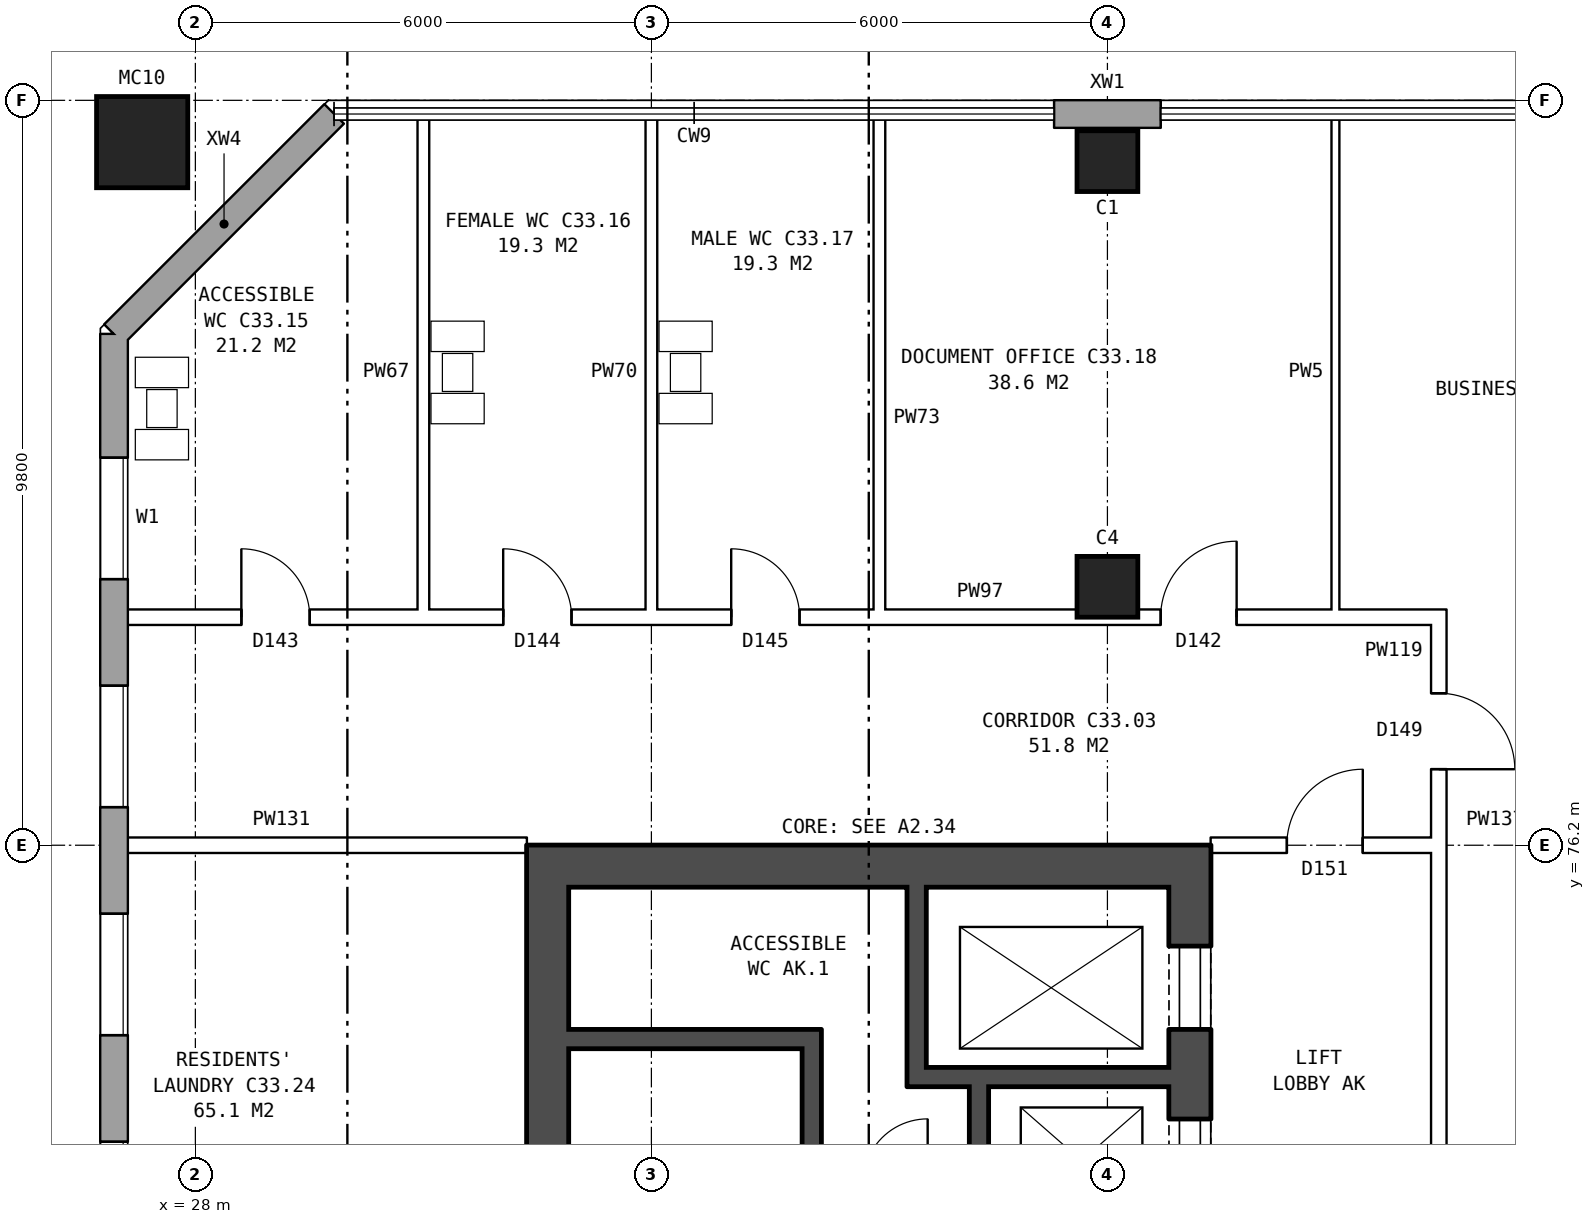
"""IFC4 building model, lengths in metres.
Left out: names, types, materials, properties, quantities, classifications, styles, units other than length and angle.
Written with IfcOpenShell. Run it as: python <this file> out.ifc"""

import sys

from ifc_helpers import new_model, si_unit, direction, frame, frame_2d, origin, origin_2d, place, context, subcontext, project, spatial, rectangle, hollow_rectangle, extrude, element, fill, save


model = new_model("IFC4")
c1 = context("Model", 3, precision=1e-05, world=origin(), true_north=direction((0.0, 1.0)))
c2 = subcontext(c1, "Body", "Model", "MODEL_VIEW")
j1 = project(units=[si_unit("LENGTHUNIT", "METRE"), si_unit("PLANEANGLEUNIT", "RADIAN")], contexts=[c1])
p1 = place(None, origin())
s1 = spatial("IfcSite", under=j1, at=p1, CompositionType="ELEMENT")
p2 = place(p1, origin())
s2 = spatial("IfcBuilding", under=s1, at=p2, CompositionType="ELEMENT")
p3 = place(p2, frame((0.0, 0.0, 119.5)))
s3 = spatial("IfcBuildingStorey", under=s2, at=p3, CompositionType="ELEMENT", Elevation=119.5)
for number, where, z_axis, x_axis in (
    (1, (40.0, 79.6, 0.0), (0.0, 0.0, 1.0), (1.0, 0.0, 0.0)),
    (2, (40.0, 85.2, 0.0), (0.0, 0.0, 1.0), (1.0, 0.0, 0.0)),
):
    element("IfcColumn", number, at=place(p3, frame(where, z_axis=z_axis, x_axis=x_axis)), inside=s3, PredefinedType="COLUMN", context=c2, shape_type="SweptSolid", body=[
        extrude(rectangle(XDim=0.8, YDim=0.8, at=origin_2d()), origin(), (0.0, 0.0, 1.0), 3.6),
    ])
p4 = place(p3, frame((27.3, 85.45, 0.0), z_axis=(0.0, 0.0, 1.0), x_axis=(1.0, 0.0, 0.0)))
e3 = element("IfcColumn", 3, at=p4, inside=s3, PredefinedType="COLUMN", context=c2, shape_type="SweptSolid", body=[
    extrude(hollow_rectangle(XDim=1.2, YDim=1.2, WallThickness=0.065, at=origin_2d()), origin(), (0.0, 0.0, 1.0), 4.2),
])
p5 = place(p3, frame((40.7, 85.82, 0.0), z_axis=(0.0, 0.0, 1.0), x_axis=(-1.0, 0.0, 0.0)))
e4 = element("IfcWall", 4, at=p5, inside=s3, PredefinedType="STANDARD", context=c2, shape_type="SweptSolid", body=[
    extrude(rectangle(XDim=1.4, YDim=0.36, at=frame_2d((0.7, 0.0))), origin(), (0.0, 0.0, 1.0), 3.6),
])
p6 = place(p3, frame((29.825, 85.82, 0.0), z_axis=(0.0, 0.0, 1.0), x_axis=(-0.707106781187, -0.707106781187, 0.0)))
e5 = element("IfcWall", 5, at=p6, inside=s3, PredefinedType="STANDARD", context=c2, shape_type="SweptSolid", body=[
    extrude(rectangle(XDim=4.094, YDim=0.36, at=frame_2d((2.047, 0.0))), origin(), (0.0, 0.0, 1.0), 3.6),
])
p7 = place(p3, frame((26.93, 82.925, 0.0), z_axis=(0.0, 0.0, 1.0), x_axis=(0.0, -1.0, 0.0)))
e6 = element("IfcWall", 6, at=p7, inside=s3, PredefinedType="STANDARD", context=c2, shape_type="SweptSolid", body=[
    extrude(rectangle(XDim=25.851, YDim=0.36, at=frame_2d((12.925, 0.0))), origin(), (0.0, 0.0, 1.0), 3.6),
])
p8 = place(p7, frame((1.625, 0.0, 0.8)))
e7 = element("IfcOpeningElement", 7, at=p8, cuts=e6, PredefinedType="OPENING", context=c2, shape_type="SweptSolid", body=[
    extrude(rectangle(XDim=1.6, YDim=1.8, at=frame_2d((0.8, 0.9))), frame((0.0, 0.19, 0.0), z_axis=(0.0, -1.0, 0.0), x_axis=(1.0, 0.0, 0.0)), (0.0, 0.0, 1.0), 0.38),
])
p9 = place(p7, frame((4.625, 0.0, 0.8)))
e8 = element("IfcOpeningElement", 8, at=p9, cuts=e6, PredefinedType="OPENING", context=c2, shape_type="SweptSolid", body=[
    extrude(rectangle(XDim=1.6, YDim=1.8, at=frame_2d((0.8, 0.9))), frame((0.0, 0.19, 0.0), z_axis=(0.0, -1.0, 0.0), x_axis=(1.0, 0.0, 0.0)), (0.0, 0.0, 1.0), 0.38),
])
p10 = place(p7, frame((7.625, 0.0, 0.8)))
e9 = element("IfcOpeningElement", 9, at=p10, cuts=e6, PredefinedType="OPENING", context=c2, shape_type="SweptSolid", body=[
    extrude(rectangle(XDim=1.6, YDim=1.8, at=frame_2d((0.8, 0.9))), frame((0.0, 0.19, 0.0), z_axis=(0.0, -1.0, 0.0), x_axis=(1.0, 0.0, 0.0)), (0.0, 0.0, 1.0), 0.38),
])
p11 = place(p7, frame((10.625, 0.0, 0.8)))
e10 = element("IfcOpeningElement", 10, at=p11, cuts=e6, PredefinedType="OPENING", context=c2, shape_type="SweptSolid", body=[
    extrude(rectangle(XDim=1.6, YDim=1.8, at=frame_2d((0.8, 0.9))), frame((0.0, 0.19, 0.0), z_axis=(0.0, -1.0, 0.0), x_axis=(1.0, 0.0, 0.0)), (0.0, 0.0, 1.0), 0.38),
])
p12 = place(p7, frame((13.625, 0.0, 0.8)))
e11 = element("IfcOpeningElement", 11, at=p12, cuts=e6, PredefinedType="OPENING", context=c2, shape_type="SweptSolid", body=[
    extrude(rectangle(XDim=1.6, YDim=1.8, at=frame_2d((0.8, 0.9))), frame((0.0, 0.19, 0.0), z_axis=(0.0, -1.0, 0.0), x_axis=(1.0, 0.0, 0.0)), (0.0, 0.0, 1.0), 0.38),
])
p13 = place(p7, frame((16.625, 0.0, 0.8)))
e12 = element("IfcOpeningElement", 12, at=p13, cuts=e6, PredefinedType="OPENING", context=c2, shape_type="SweptSolid", body=[
    extrude(rectangle(XDim=1.6, YDim=1.8, at=frame_2d((0.8, 0.9))), frame((0.0, 0.19, 0.0), z_axis=(0.0, -1.0, 0.0), x_axis=(1.0, 0.0, 0.0)), (0.0, 0.0, 1.0), 0.38),
])
p14 = place(p7, frame((19.625, 0.0, 0.8)))
e13 = element("IfcOpeningElement", 13, at=p14, cuts=e6, PredefinedType="OPENING", context=c2, shape_type="SweptSolid", body=[
    extrude(rectangle(XDim=1.6, YDim=1.8, at=frame_2d((0.8, 0.9))), frame((0.0, 0.19, 0.0), z_axis=(0.0, -1.0, 0.0), x_axis=(1.0, 0.0, 0.0)), (0.0, 0.0, 1.0), 0.38),
])
p15 = place(p7, frame((22.625, 0.0, 0.8)))
e14 = element("IfcOpeningElement", 14, at=p15, cuts=e6, PredefinedType="OPENING", context=c2, shape_type="SweptSolid", body=[
    extrude(rectangle(XDim=1.6, YDim=1.8, at=frame_2d((0.8, 0.9))), frame((0.0, 0.19, 0.0), z_axis=(0.0, -1.0, 0.0), x_axis=(1.0, 0.0, 0.0)), (0.0, 0.0, 1.0), 0.38),
])
p16 = place(p3, frame((41.085, 76.2, 0.0), z_axis=(0.0, 0.0, 1.0), x_axis=(0.0, -1.0, 0.0)))
e15 = element("IfcWall", 15, at=p16, inside=s3, PredefinedType="SHEAR", context=c2, shape_type="SweptSolid", body=[
    extrude(rectangle(XDim=12.4, YDim=0.55, at=frame_2d((6.2, 0.0))), origin(), (0.0, 0.0, 1.0), 3.6),
])
p17 = place(p16, frame((1.325, 0.0, 0.0)))
e16 = element("IfcOpeningElement", 16, at=p17, cuts=e15, PredefinedType="OPENING", context=c2, shape_type="SweptSolid", body=[
    extrude(rectangle(XDim=1.1, YDim=2.1, at=frame_2d((0.55, 1.05))), frame((0.0, 0.285, 0.0), z_axis=(0.0, -1.0, 0.0), x_axis=(1.0, 0.0, 0.0)), (0.0, 0.0, 1.0), 0.57),
])
p18 = place(p16, frame((3.6, 0.0, 0.0)))
e17 = element("IfcOpeningElement", 17, at=p18, cuts=e15, PredefinedType="OPENING", context=c2, shape_type="SweptSolid", body=[
    extrude(rectangle(XDim=1.1, YDim=2.1, at=frame_2d((0.55, 1.05))), frame((0.0, 0.285, 0.0), z_axis=(0.0, -1.0, 0.0), x_axis=(1.0, 0.0, 0.0)), (0.0, 0.0, 1.0), 0.57),
])
p19 = place(p16, frame((5.8, 0.0, 0.0)))
e18 = element("IfcOpeningElement", 18, at=p19, cuts=e15, PredefinedType="OPENING", context=c2, shape_type="SweptSolid", body=[
    extrude(rectangle(XDim=1.1, YDim=2.1, at=frame_2d((0.55, 1.05))), frame((0.0, 0.285, 0.0), z_axis=(0.0, -1.0, 0.0), x_axis=(1.0, 0.0, 0.0)), (0.0, 0.0, 1.0), 0.57),
])
p20 = place(p16, frame((8.0, 0.0, 0.0)))
e19 = element("IfcOpeningElement", 19, at=p20, cuts=e15, PredefinedType="OPENING", context=c2, shape_type="SweptSolid", body=[
    extrude(rectangle(XDim=1.1, YDim=2.1, at=frame_2d((0.55, 1.05))), frame((0.0, 0.285, 0.0), z_axis=(0.0, -1.0, 0.0), x_axis=(1.0, 0.0, 0.0)), (0.0, 0.0, 1.0), 0.57),
])
p21 = place(p16, frame((9.9, 0.0, 0.0)))
e20 = element("IfcOpeningElement", 20, at=p21, cuts=e15, PredefinedType="OPENING", context=c2, shape_type="SweptSolid", body=[
    extrude(rectangle(XDim=1.1, YDim=2.1, at=frame_2d((0.55, 1.05))), frame((0.0, 0.285, 0.0), z_axis=(0.0, -1.0, 0.0), x_axis=(1.0, 0.0, 0.0)), (0.0, 0.0, 1.0), 0.57),
])
p22 = place(p3, frame((32.635, 76.2, 0.0), z_axis=(0.0, 0.0, 1.0), x_axis=(0.0, -1.0, 0.0)))
e21 = element("IfcWall", 21, at=p22, inside=s3, PredefinedType="SHEAR", context=c2, shape_type="SweptSolid", body=[
    extrude(rectangle(XDim=12.4, YDim=0.55, at=frame_2d((6.2, 0.0))), origin(), (0.0, 0.0, 1.0), 3.6),
])
p23 = place(p3, frame((40.81, 75.925, 0.0), z_axis=(0.0, 0.0, 1.0), x_axis=(-1.0, 0.0, 0.0)))
e22 = element("IfcWall", 22, at=p23, inside=s3, PredefinedType="SHEAR", context=c2, shape_type="SweptSolid", body=[
    extrude(rectangle(XDim=7.9, YDim=0.55, at=frame_2d((3.95, 0.0))), origin(), (0.0, 0.0, 1.0), 3.6),
])
p24 = place(p3, frame((35.985, 73.65, 0.0), z_axis=(0.0, 0.0, 1.0), x_axis=(-1.0, 0.0, 0.0)))
e23 = element("IfcWall", 23, at=p24, inside=s3, PredefinedType="SHEAR", context=c2, shape_type="SweptSolid", body=[
    extrude(rectangle(XDim=3.075, YDim=0.25, at=frame_2d((1.538, 0.0))), origin(), (0.0, 0.0, 1.0), 3.6),
])
p25 = place(p3, frame((40.81, 73.15, 0.0), z_axis=(0.0, 0.0, 1.0), x_axis=(-1.0, 0.0, 0.0)))
e24 = element("IfcWall", 24, at=p25, inside=s3, PredefinedType="SHEAR", context=c2, shape_type="SweptSolid", body=[
    extrude(rectangle(XDim=3.445, YDim=0.25, at=frame_2d((1.723, 0.0))), origin(), (0.0, 0.0, 1.0), 3.6),
])
p26 = place(p3, frame((38.31, 73.025, 0.0), z_axis=(0.0, 0.0, 1.0), x_axis=(0.0, -1.0, 0.0)))
e25 = element("IfcWall", 25, at=p26, inside=s3, PredefinedType="SHEAR", context=c2, shape_type="SweptSolid", body=[
    extrude(rectangle(XDim=6.6, YDim=0.25, at=frame_2d((3.3, 0.0))), origin(), (0.0, 0.0, 1.0), 3.6),
])
p27 = place(p3, frame((37.49, 75.65, 0.0), z_axis=(0.0, 0.0, 1.0), x_axis=(0.0, -1.0, 0.0)))
e26 = element("IfcWall", 26, at=p27, inside=s3, PredefinedType="SHEAR", context=c2, shape_type="SweptSolid", body=[
    extrude(rectangle(XDim=2.375, YDim=0.25, at=frame_2d((1.188, 0.0))), origin(), (0.0, 0.0, 1.0), 3.6),
])
p28 = place(p3, frame((36.11, 73.775, 0.0), z_axis=(0.0, 0.0, 1.0), x_axis=(0.0, -1.0, 0.0)))
e27 = element("IfcWall", 27, at=p28, inside=s3, PredefinedType="SHEAR", context=c2, shape_type="SweptSolid", body=[
    extrude(rectangle(XDim=7.35, YDim=0.25, at=frame_2d((3.675, 0.0))), origin(), (0.0, 0.0, 1.0), 3.6),
])
p29 = place(p3, frame((44.36, 63.9, 0.0), z_axis=(0.0, 0.0, 1.0), x_axis=(0.0, 1.0, 0.0)))
e28 = element("IfcWall", 28, at=p29, inside=s3, PredefinedType="PARTITIONING", context=c2, shape_type="SweptSolid", body=[
    extrude(rectangle(XDim=12.2, YDim=0.2, at=frame_2d((6.1, 0.0))), origin(), (0.0, 0.0, 1.0), 3.6),
])
p30 = place(p29, frame((5.1, 0.0, 0.0)))
e29 = element("IfcOpeningElement", 29, at=p30, cuts=e28, PredefinedType="OPENING", context=c2, shape_type="SweptSolid", body=[
    extrude(rectangle(XDim=2.0, YDim=2.1, at=frame_2d((1.0, 1.05))), frame((0.0, 0.11, 0.0), z_axis=(0.0, -1.0, 0.0), x_axis=(1.0, 0.0, 0.0)), (0.0, 0.0, 1.0), 0.22),
])
p31 = place(p3, frame((26.99, 76.2, 0.0), z_axis=(0.0, 0.0, 1.0), x_axis=(1.0, 0.0, 0.0)))
e30 = element("IfcWall", 30, at=p31, inside=s3, PredefinedType="PARTITIONING", context=c2, shape_type="SweptSolid", body=[
    extrude(rectangle(XDim=5.37, YDim=0.2, at=frame_2d((2.685, 0.0))), origin(), (0.0, 0.0, 1.0), 3.6),
])
p32 = place(p3, frame((41.36, 76.2, 0.0), z_axis=(0.0, 0.0, 1.0), x_axis=(1.0, 0.0, 0.0)))
e31 = element("IfcWall", 31, at=p32, inside=s3, PredefinedType="PARTITIONING", context=c2, shape_type="SweptSolid", body=[
    extrude(rectangle(XDim=3.1, YDim=0.2, at=frame_2d((1.55, 0.0))), origin(), (0.0, 0.0, 1.0), 3.6),
])
p33 = place(p32, frame((1.0, 0.0, 0.0)))
e32 = element("IfcOpeningElement", 32, at=p33, cuts=e31, PredefinedType="OPENING", context=c2, shape_type="SweptSolid", body=[
    extrude(rectangle(XDim=1.0, YDim=2.1, at=frame_2d((0.5, 1.05))), frame((0.0, 0.11, 0.0), z_axis=(0.0, -1.0, 0.0), x_axis=(1.0, 0.0, 0.0)), (0.0, 0.0, 1.0), 0.22),
])
p34 = place(p3, frame((26.99, 79.2, 0.0), z_axis=(0.0, 0.0, 1.0), x_axis=(1.0, 0.0, 0.0)))
e33 = element("IfcWall", 33, at=p34, inside=s3, PredefinedType="PARTITIONING", context=c2, shape_type="SweptSolid", body=[
    extrude(rectangle(XDim=17.47, YDim=0.2, at=frame_2d((8.735, 0.0))), origin(), (0.0, 0.0, 1.0), 3.6),
])
p35 = place(p34, frame((1.615, 0.0, 0.0)))
e34 = element("IfcOpeningElement", 34, at=p35, cuts=e33, PredefinedType="OPENING", context=c2, shape_type="SweptSolid", body=[
    extrude(rectangle(XDim=0.9, YDim=2.1, at=frame_2d((0.45, 1.05))), frame((0.0, 0.11, 0.0), z_axis=(0.0, -1.0, 0.0), x_axis=(1.0, 0.0, 0.0)), (0.0, 0.0, 1.0), 0.22),
])
p36 = place(p34, frame((5.06, 0.0, 0.0)))
e35 = element("IfcOpeningElement", 35, at=p36, cuts=e33, PredefinedType="OPENING", context=c2, shape_type="SweptSolid", body=[
    extrude(rectangle(XDim=0.9, YDim=2.1, at=frame_2d((0.45, 1.05))), frame((0.0, 0.11, 0.0), z_axis=(0.0, -1.0, 0.0), x_axis=(1.0, 0.0, 0.0)), (0.0, 0.0, 1.0), 0.22),
])
p37 = place(p34, frame((8.06, 0.0, 0.0)))
e36 = element("IfcOpeningElement", 36, at=p37, cuts=e33, PredefinedType="OPENING", context=c2, shape_type="SweptSolid", body=[
    extrude(rectangle(XDim=0.9, YDim=2.1, at=frame_2d((0.45, 1.05))), frame((0.0, 0.11, 0.0), z_axis=(0.0, -1.0, 0.0), x_axis=(1.0, 0.0, 0.0)), (0.0, 0.0, 1.0), 0.22),
])
p38 = place(p34, frame((13.71, 0.0, 0.0)))
e37 = element("IfcOpeningElement", 37, at=p38, cuts=e33, PredefinedType="OPENING", context=c2, shape_type="SweptSolid", body=[
    extrude(rectangle(XDim=1.0, YDim=2.1, at=frame_2d((0.5, 1.05))), frame((0.0, 0.11, 0.0), z_axis=(0.0, -1.0, 0.0), x_axis=(1.0, 0.0, 0.0)), (0.0, 0.0, 1.0), 0.22),
])
for number, where, z_axis, x_axis in (
    (38, (31.0, 79.1, 0.0), (0.0, 0.0, 1.0), (0.0, 1.0, 0.0)),
    (39, (34.0, 79.1, 0.0), (0.0, 0.0, 1.0), (0.0, 1.0, 0.0)),
    (40, (37.0, 79.1, 0.0), (0.0, 0.0, 1.0), (0.0, 1.0, 0.0)),
):
    element("IfcWall", number, at=place(p3, frame(where, z_axis=z_axis, x_axis=x_axis)), inside=s3, PredefinedType="PLUMBINGWALL", context=c2, shape_type="SweptSolid", body=[
        extrude(rectangle(XDim=6.66, YDim=0.15, at=frame_2d((3.33, 0.0))), origin(), (0.0, 0.0, 1.0), 3.6),
    ])
p39 = place(p3, frame((43.0, 79.1, 0.0), z_axis=(0.0, 0.0, 1.0), x_axis=(0.0, 1.0, 0.0)))
e41 = element("IfcWall", 41, at=p39, inside=s3, PredefinedType="PARTITIONING", context=c2, shape_type="SweptSolid", body=[
    extrude(rectangle(XDim=6.66, YDim=0.1, at=frame_2d((3.33, 0.0))), origin(), (0.0, 0.0, 1.0), 3.6),
])
p40 = place(p3, frame((44.36, 76.1, 0.0), z_axis=(0.0, 0.0, 1.0), x_axis=(0.0, 1.0, 0.0)))
e42 = element("IfcWall", 42, at=p40, inside=s3, PredefinedType="PARTITIONING", context=c2, shape_type="SweptSolid", body=[
    extrude(rectangle(XDim=3.2, YDim=0.2, at=frame_2d((1.6, 0.0))), origin(), (0.0, 0.0, 1.0), 3.6),
])
p41 = place(p40, frame((1.1, 0.0, 0.0)))
e43 = element("IfcOpeningElement", 43, at=p41, cuts=e42, PredefinedType="OPENING", context=c2, shape_type="SweptSolid", body=[
    extrude(rectangle(XDim=1.0, YDim=2.1, at=frame_2d((0.5, 1.05))), frame((0.0, 0.11, 0.0), z_axis=(0.0, -1.0, 0.0), x_axis=(1.0, 0.0, 0.0)), (0.0, 0.0, 1.0), 0.22),
])
p42 = place(p8, origin())
e44 = element("IfcWindow", 44, at=p42, inside=s3, PartitioningType="SINGLE_PANEL", PredefinedType="WINDOW", context=c2, shape_type="SweptSolid", body=[
    extrude(rectangle(XDim=1.6, YDim=1.8, at=frame_2d((0.8, 0.9))), frame((0.0, 0.15, 0.0), z_axis=(0.0, -1.0, 0.0), x_axis=(1.0, 0.0, 0.0)), (0.0, 0.0, 1.0), 0.06),
])
fill(e7, e44)
p43 = place(p9, origin())
e45 = element("IfcWindow", 45, at=p43, inside=s3, PartitioningType="SINGLE_PANEL", PredefinedType="WINDOW", context=c2, shape_type="SweptSolid", body=[
    extrude(rectangle(XDim=1.6, YDim=1.8, at=frame_2d((0.8, 0.9))), frame((0.0, 0.15, 0.0), z_axis=(0.0, -1.0, 0.0), x_axis=(1.0, 0.0, 0.0)), (0.0, 0.0, 1.0), 0.06),
])
fill(e8, e45)
p44 = place(p10, origin())
e46 = element("IfcWindow", 46, at=p44, inside=s3, PartitioningType="SINGLE_PANEL", PredefinedType="WINDOW", context=c2, shape_type="SweptSolid", body=[
    extrude(rectangle(XDim=1.6, YDim=1.8, at=frame_2d((0.8, 0.9))), frame((0.0, 0.15, 0.0), z_axis=(0.0, -1.0, 0.0), x_axis=(1.0, 0.0, 0.0)), (0.0, 0.0, 1.0), 0.06),
])
fill(e9, e46)
p45 = place(p11, origin())
e47 = element("IfcWindow", 47, at=p45, inside=s3, PartitioningType="SINGLE_PANEL", PredefinedType="WINDOW", context=c2, shape_type="SweptSolid", body=[
    extrude(rectangle(XDim=1.6, YDim=1.8, at=frame_2d((0.8, 0.9))), frame((0.0, 0.15, 0.0), z_axis=(0.0, -1.0, 0.0), x_axis=(1.0, 0.0, 0.0)), (0.0, 0.0, 1.0), 0.06),
])
fill(e10, e47)
p46 = place(p17, origin())
e48 = element("IfcDoor", 48, at=p46, inside=s3, OperationType="DOUBLE_DOOR_SLIDING", PredefinedType="DOOR", context=c2, shape_type="SweptSolid", body=[
    extrude(rectangle(XDim=1.1, YDim=2.1, at=frame_2d((0.55, 1.05))), frame((0.0, -0.21, 0.0), z_axis=(0.0, -1.0, 0.0), x_axis=(1.0, 0.0, 0.0)), (0.0, 0.0, 1.0), 0.05),
])
fill(e16, e48)
p47 = place(p18, origin())
e49 = element("IfcDoor", 49, at=p47, inside=s3, OperationType="DOUBLE_DOOR_SLIDING", PredefinedType="DOOR", context=c2, shape_type="SweptSolid", body=[
    extrude(rectangle(XDim=1.1, YDim=2.1, at=frame_2d((0.55, 1.05))), frame((0.0, -0.21, 0.0), z_axis=(0.0, -1.0, 0.0), x_axis=(1.0, 0.0, 0.0)), (0.0, 0.0, 1.0), 0.05),
])
fill(e17, e49)
p48 = place(p33, origin())
e50 = element("IfcDoor", 50, at=p48, inside=s3, OperationType="SINGLE_SWING_RIGHT", PredefinedType="DOOR", context=c2, shape_type="SweptSolid", body=[
    extrude(rectangle(XDim=1.0, YDim=2.1, at=frame_2d((0.5, 1.05))), frame((0.0, 0.025, 0.0), z_axis=(0.0, -1.0, 0.0), x_axis=(1.0, 0.0, 0.0)), (0.0, 0.0, 1.0), 0.05),
])
fill(e32, e50)
p49 = place(p35, origin())
e51 = element("IfcDoor", 51, at=p49, inside=s3, OperationType="SINGLE_SWING_LEFT", PredefinedType="DOOR", context=c2, shape_type="SweptSolid", body=[
    extrude(rectangle(XDim=0.9, YDim=2.1, at=frame_2d((0.45, 1.05))), frame((0.0, 0.025, 0.0), z_axis=(0.0, -1.0, 0.0), x_axis=(1.0, 0.0, 0.0)), (0.0, 0.0, 1.0), 0.05),
])
fill(e34, e51)
p50 = place(p36, origin())
e52 = element("IfcDoor", 52, at=p50, inside=s3, OperationType="SINGLE_SWING_LEFT", PredefinedType="DOOR", context=c2, shape_type="SweptSolid", body=[
    extrude(rectangle(XDim=0.9, YDim=2.1, at=frame_2d((0.45, 1.05))), frame((0.0, 0.025, 0.0), z_axis=(0.0, -1.0, 0.0), x_axis=(1.0, 0.0, 0.0)), (0.0, 0.0, 1.0), 0.05),
])
fill(e35, e52)
p51 = place(p37, origin())
e53 = element("IfcDoor", 53, at=p51, inside=s3, OperationType="SINGLE_SWING_LEFT", PredefinedType="DOOR", context=c2, shape_type="SweptSolid", body=[
    extrude(rectangle(XDim=0.9, YDim=2.1, at=frame_2d((0.45, 1.05))), frame((0.0, 0.025, 0.0), z_axis=(0.0, -1.0, 0.0), x_axis=(1.0, 0.0, 0.0)), (0.0, 0.0, 1.0), 0.05),
])
fill(e36, e53)
p52 = place(p38, origin())
e54 = element("IfcDoor", 54, at=p52, inside=s3, OperationType="SINGLE_SWING_RIGHT", PredefinedType="DOOR", context=c2, shape_type="SweptSolid", body=[
    extrude(rectangle(XDim=1.0, YDim=2.1, at=frame_2d((0.5, 1.05))), frame((0.0, 0.025, 0.0), z_axis=(0.0, -1.0, 0.0), x_axis=(1.0, 0.0, 0.0)), (0.0, 0.0, 1.0), 0.05),
])
fill(e37, e54)
p53 = place(p41, frame((1.0, 0.0, 0.0), z_axis=(0.0, 0.0, 1.0), x_axis=(-1.0, 0.0, 0.0)))
e55 = element("IfcDoor", 55, at=p53, inside=s3, OperationType="SINGLE_SWING_RIGHT", PredefinedType="DOOR", context=c2, shape_type="SweptSolid", body=[
    extrude(rectangle(XDim=1.0, YDim=2.1, at=frame_2d((0.5, 1.05))), frame((0.0, 0.025, 0.0), z_axis=(0.0, -1.0, 0.0), x_axis=(1.0, 0.0, 0.0)), (0.0, 0.0, 1.0), 0.05),
])
fill(e43, e55)
save(model, sys.argv[1])
